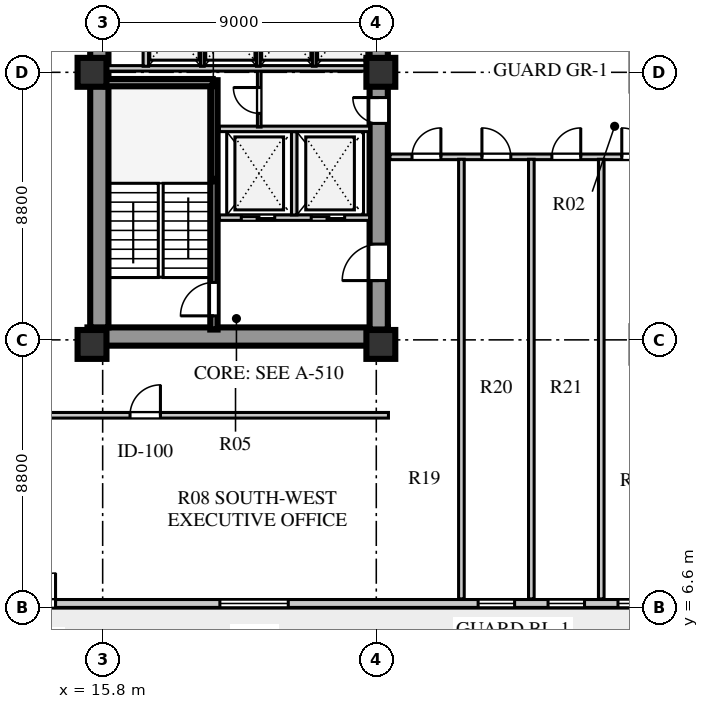
"""IFC4 building model, lengths in metres.
Left out: names, types, materials, properties, quantities, classifications, styles, units other than length and angle.
Written with IfcOpenShell. Run it as: python <this file> out.ifc"""

import sys

from ifc_helpers import new_model, si_unit, direction, frame, frame_2d, origin, origin_2d, place, context, subcontext, project, spatial, rectangle, extrude, element, fill, save


model = new_model("IFC4")
c1 = context("Model", 3, precision=1e-05, world=origin(), true_north=direction((0.0, 1.0)))
c2 = subcontext(c1, "Body", "Model", "MODEL_VIEW")
j1 = project(units=[si_unit("LENGTHUNIT", "METRE"), si_unit("PLANEANGLEUNIT", "RADIAN")], contexts=[c1])
p1 = place(None, origin())
s1 = spatial("IfcSite", under=j1, at=p1, CompositionType="ELEMENT")
p2 = place(p1, origin())
s2 = spatial("IfcBuilding", under=s1, at=p2, CompositionType="ELEMENT")
p3 = place(p2, frame((0.0, 0.0, 74.0)))
s3 = spatial("IfcBuildingStorey", under=s2, at=p3, CompositionType="ELEMENT", Elevation=74.0)
p4 = place(p3, frame((15.3, 15.51, 0.0), z_axis=(0.0, 0.0, 1.0), x_axis=(1.0, 0.0, 0.0)))
e1 = element("IfcWall", 1, at=p4, inside=s3, PredefinedType="SHEAR", context=c2, shape_type="SweptSolid", body=[
    extrude(rectangle(XDim=9.88, YDim=0.6, at=frame_2d((4.94, 0.0))), origin(), (0.0, 0.0, 1.0), 3.72),
])
p5 = place(p3, frame((15.69, 15.81, 0.0), z_axis=(0.0, 0.0, 1.0), x_axis=(0.0, 1.0, 0.0)))
e2 = element("IfcWall", 2, at=p5, inside=s3, PredefinedType="SHEAR", context=c2, shape_type="SweptSolid", body=[
    extrude(rectangle(XDim=25.63, YDim=0.6, at=frame_2d((12.815, 0.0))), origin(), (0.0, 0.0, 1.0), 3.72),
])
p6 = place(p3, frame((24.88, 15.74, 0.0), z_axis=(0.0, 0.0, 1.0), x_axis=(0.0, 1.0, 0.0)))
e3 = element("IfcWall", 3, at=p6, inside=s3, PredefinedType="SHEAR", context=c2, shape_type="SweptSolid", body=[
    extrude(rectangle(XDim=25.76, YDim=0.6, at=frame_2d((12.88, 0.0))), origin(), (0.0, 0.0, 1.0), 3.72),
])
p7 = place(p6, frame((1.61, 0.0, 0.0)))
e4 = element("IfcOpeningElement", 4, at=p7, cuts=e3, PredefinedType="OPENING", context=c2, shape_type="SweptSolid", body=[
    extrude(rectangle(XDim=1.2, YDim=2.1, at=frame_2d((0.6, 1.05))), frame((0.0, 0.31, 0.0), z_axis=(0.0, -1.0, 0.0), x_axis=(1.0, 0.0, 0.0)), (0.0, 0.0, 1.0), 0.62),
])
p8 = place(p6, frame((6.78, 0.0, 0.0)))
e5 = element("IfcOpeningElement", 5, at=p8, cuts=e3, PredefinedType="OPENING", context=c2, shape_type="SweptSolid", body=[
    extrude(rectangle(XDim=0.85, YDim=2.06, at=frame_2d((0.425, 1.03))), frame((0.0, 0.31, 0.0), z_axis=(0.0, -1.0, 0.0), x_axis=(1.0, 0.0, 0.0)), (0.0, 0.0, 1.0), 0.62),
])
p9 = place(p6, frame((12.11, 0.0, 0.0)))
e6 = element("IfcOpeningElement", 6, at=p9, cuts=e3, PredefinedType="OPENING", context=c2, shape_type="SweptSolid", body=[
    extrude(rectangle(XDim=1.5, YDim=2.12, at=frame_2d((0.75, 1.06))), frame((0.0, 0.31, 0.0), z_axis=(0.0, -1.0, 0.0), x_axis=(1.0, 0.0, 0.0)), (0.0, 0.0, 1.0), 0.62),
])
p10 = place(p6, frame((20.11, 0.0, 0.0)))
e7 = element("IfcOpeningElement", 7, at=p10, cuts=e3, PredefinedType="OPENING", context=c2, shape_type="SweptSolid", body=[
    extrude(rectangle(XDim=1.2, YDim=2.12, at=frame_2d((0.6, 1.06))), frame((0.0, 0.31, 0.0), z_axis=(0.0, -1.0, 0.0), x_axis=(1.0, 0.0, 0.0)), (0.0, 0.0, 1.0), 0.62),
])
p11 = place(p6, frame((24.01, 0.0, 0.0)))
e8 = element("IfcOpeningElement", 8, at=p11, cuts=e3, PredefinedType="OPENING", context=c2, shape_type="SweptSolid", body=[
    extrude(rectangle(XDim=0.95, YDim=2.1, at=frame_2d((0.475, 1.05))), frame((0.0, 0.31, 0.0), z_axis=(0.0, -1.0, 0.0), x_axis=(1.0, 0.0, 0.0)), (0.0, 0.0, 1.0), 0.62),
])
for number, where, z_axis, x_axis in (
    (9, (15.45, 15.25, 0.0), (0.0, 0.0, 1.0), (1.0, 0.0, 0.0)),
    (10, (15.45, 24.2, 0.0), (0.0, 0.0, 1.0), (1.0, 0.0, 0.0)),
    (11, (24.95, 15.25, 0.0), (0.0, 0.0, 1.0), (1.0, 0.0, 0.0)),
    (12, (24.95, 24.2, 0.0), (0.0, 0.0, 1.0), (1.0, 0.0, 0.0)),
):
    element("IfcColumn", number, at=place(p3, frame(where, z_axis=z_axis, x_axis=x_axis)), inside=s3, PredefinedType="COLUMN", context=c2, shape_type="SweptSolid", body=[
        extrude(rectangle(XDim=0.95, YDim=0.95, at=origin_2d()), origin(), (0.0, 0.0, 1.0), 3.72),
    ])
p12 = place(p3, frame((12.3, 6.73, 0.0), z_axis=(0.0, 0.0, 1.0), x_axis=(1.0, 0.0, 0.0)))
e13 = element("IfcWall", 13, at=p12, inside=s3, PredefinedType="SOLIDWALL", context=c2, shape_type="SweptSolid", body=[
    extrude(rectangle(XDim=34.0, YDim=0.26, at=frame_2d((17.0, 0.0))), origin(), (0.0, 0.0, 1.0), 3.72),
])
p13 = place(p12, frame((0.95, 0.0, 0.0)))
e14 = element("IfcOpeningElement", 14, at=p13, cuts=e13, PredefinedType="OPENING", context=c2, shape_type="SweptSolid", body=[
    extrude(rectangle(XDim=1.0, YDim=2.05, at=frame_2d((0.5, 1.025))), frame((0.0, 0.14, 0.0), z_axis=(0.0, -1.0, 0.0), x_axis=(1.0, 0.0, 0.0)), (0.0, 0.0, 1.0), 0.28),
])
p14 = place(p12, frame((7.355, 0.0, 0.8)))
e15 = element("IfcOpeningElement", 15, at=p14, cuts=e13, PredefinedType="OPENING", context=c2, shape_type="SweptSolid", body=[
    extrude(rectangle(XDim=2.25, YDim=2.0, at=frame_2d((1.125, 1.0))), frame((0.0, 0.14, 0.0), z_axis=(0.0, -1.0, 0.0), x_axis=(1.0, 0.0, 0.0)), (0.0, 0.0, 1.0), 0.28),
])
p15 = place(p12, frame((15.85, 0.0, 0.8)))
e16 = element("IfcOpeningElement", 16, at=p15, cuts=e13, PredefinedType="OPENING", context=c2, shape_type="SweptSolid", body=[
    extrude(rectangle(XDim=1.2, YDim=1.75, at=frame_2d((0.6, 0.875))), frame((0.0, 0.14, 0.0), z_axis=(0.0, -1.0, 0.0), x_axis=(1.0, 0.0, 0.0)), (0.0, 0.0, 1.0), 0.28),
])
p16 = place(p12, frame((18.15, 0.0, 0.8)))
e17 = element("IfcOpeningElement", 17, at=p16, cuts=e13, PredefinedType="OPENING", context=c2, shape_type="SweptSolid", body=[
    extrude(rectangle(XDim=1.2, YDim=1.75, at=frame_2d((0.6, 0.875))), frame((0.0, 0.14, 0.0), z_axis=(0.0, -1.0, 0.0), x_axis=(1.0, 0.0, 0.0)), (0.0, 0.0, 1.0), 0.28),
])
p17 = place(p12, frame((20.45, 0.0, 0.8)))
e18 = element("IfcOpeningElement", 18, at=p17, cuts=e13, PredefinedType="OPENING", context=c2, shape_type="SweptSolid", body=[
    extrude(rectangle(XDim=1.2, YDim=1.75, at=frame_2d((0.6, 0.875))), frame((0.0, 0.14, 0.0), z_axis=(0.0, -1.0, 0.0), x_axis=(1.0, 0.0, 0.0)), (0.0, 0.0, 1.0), 0.28),
])
p18 = place(p12, frame((28.655, 0.0, 0.8)))
e19 = element("IfcOpeningElement", 19, at=p18, cuts=e13, PredefinedType="OPENING", context=c2, shape_type="SweptSolid", body=[
    extrude(rectangle(XDim=2.4, YDim=2.05, at=frame_2d((1.2, 1.025))), frame((0.0, 0.14, 0.0), z_axis=(0.0, -1.0, 0.0), x_axis=(1.0, 0.0, 0.0)), (0.0, 0.0, 1.0), 0.28),
])
p19 = place(p3, frame((19.46, 15.74, 0.0), z_axis=(0.0, 0.0, 1.0), x_axis=(0.0, 1.0, 0.0)))
e20 = element("IfcWall", 20, at=p19, inside=s3, PredefinedType="SHEAR", context=c2, shape_type="SweptSolid", body=[
    extrude(rectangle(XDim=8.2, YDim=0.24, at=frame_2d((4.1, 0.0))), origin(), (0.0, 0.0, 1.0), 4.0),
])
p20 = place(p19, frame((0.45, 0.0, 0.0)))
e21 = element("IfcOpeningElement", 21, at=p20, cuts=e20, PredefinedType="OPENING", context=c2, shape_type="SweptSolid", body=[
    extrude(rectangle(XDim=1.1, YDim=2.1, at=frame_2d((0.55, 1.05))), frame((0.0, 0.13, 0.0), z_axis=(0.0, -1.0, 0.0), x_axis=(1.0, 0.0, 0.0)), (0.0, 0.0, 1.0), 0.26),
])
p21 = place(p3, frame((15.9, 23.86, 0.0), z_axis=(0.0, 0.0, 1.0), x_axis=(1.0, 0.0, 0.0)))
e22 = element("IfcWall", 22, at=p21, inside=s3, PredefinedType="SHEAR", context=c2, shape_type="SweptSolid", body=[
    extrude(rectangle(XDim=3.52, YDim=0.24, at=frame_2d((1.76, 0.0))), origin(), (0.0, 0.0, 1.0), 4.0),
])
p22 = place(p3, frame((19.64, 19.42, 0.0), z_axis=(0.0, 0.0, 1.0), x_axis=(1.0, 0.0, 0.0)))
e23 = element("IfcWall", 23, at=p22, inside=s3, PredefinedType="SOLIDWALL", context=c2, shape_type="SweptSolid", body=[
    extrude(rectangle(XDim=4.94, YDim=0.18, at=frame_2d((2.47, 0.0))), origin(), (0.0, 0.0, 1.0), 3.72),
])
p23 = place(p22, frame((0.72, 0.0, 0.0)))
e24 = element("IfcOpeningElement", 24, at=p23, cuts=e23, PredefinedType="OPENING", context=c2, shape_type="SweptSolid", body=[
    extrude(rectangle(XDim=1.1, YDim=2.1, at=frame_2d((0.55, 1.05))), frame((0.0, 0.1, 0.0), z_axis=(0.0, -1.0, 0.0), x_axis=(1.0, 0.0, 0.0)), (0.0, 0.0, 1.0), 0.2),
])
p24 = place(p22, frame((3.02, 0.0, 0.0)))
e25 = element("IfcOpeningElement", 25, at=p24, cuts=e23, PredefinedType="OPENING", context=c2, shape_type="SweptSolid", body=[
    extrude(rectangle(XDim=1.1, YDim=2.1, at=frame_2d((0.55, 1.05))), frame((0.0, 0.1, 0.0), z_axis=(0.0, -1.0, 0.0), x_axis=(1.0, 0.0, 0.0)), (0.0, 0.0, 1.0), 0.2),
])
p25 = place(p3, frame((22.1, 19.51, 0.0), z_axis=(0.0, 0.0, 1.0), x_axis=(0.0, 1.0, 0.0)))
e26 = element("IfcWall", 26, at=p25, inside=s3, PredefinedType="SOLIDWALL", context=c2, shape_type="SweptSolid", body=[
    extrude(rectangle(XDim=2.74, YDim=0.18, at=frame_2d((1.37, 0.0))), origin(), (0.0, 0.0, 1.0), 3.72),
])
p26 = place(p3, frame((19.64, 22.34, 0.0), z_axis=(0.0, 0.0, 1.0), x_axis=(1.0, 0.0, 0.0)))
e27 = element("IfcWall", 27, at=p26, inside=s3, PredefinedType="SOLIDWALL", context=c2, shape_type="SweptSolid", body=[
    extrude(rectangle(XDim=4.94, YDim=0.18, at=frame_2d((2.47, 0.0))), origin(), (0.0, 0.0, 1.0), 3.72),
])
p27 = place(p3, frame((20.95, 22.4, 0.0), z_axis=(0.0, 0.0, 1.0), x_axis=(0.0, 1.0, 0.0)))
e28 = element("IfcWall", 28, at=p27, inside=s3, PredefinedType="PARTITIONING", context=c2, shape_type="SweptSolid", body=[
    extrude(rectangle(XDim=1.88, YDim=0.12, at=frame_2d((0.94, 0.0))), origin(), (0.0, 0.0, 1.0), 3.72),
])
p28 = place(p27, frame((0.45, 0.0, 0.0)))
e29 = element("IfcOpeningElement", 29, at=p28, cuts=e28, PredefinedType="OPENING", context=c2, shape_type="SweptSolid", body=[
    extrude(rectangle(XDim=0.85, YDim=2.06, at=frame_2d((0.425, 1.03))), frame((0.0, 0.07, 0.0), z_axis=(0.0, -1.0, 0.0), x_axis=(1.0, 0.0, 0.0)), (0.0, 0.0, 1.0), 0.14),
])
p29 = place(p3, frame((15.9, 24.33, 0.0), z_axis=(0.0, 0.0, 1.0), x_axis=(1.0, 0.0, 0.0)))
e30 = element("IfcWall", 30, at=p29, inside=s3, PredefinedType="SOLIDWALL", context=c2, shape_type="SweptSolid", body=[
    extrude(rectangle(XDim=8.68, YDim=0.18, at=frame_2d((4.34, 0.0))), origin(), (0.0, 0.0, 1.0), 3.02),
])
p30 = place(p3, frame((17.22, 24.4, 0.0), z_axis=(0.0, 0.0, 1.0), x_axis=(0.0, 1.0, 0.0)))
e31 = element("IfcWall", 31, at=p30, inside=s3, PredefinedType="SOLIDWALL", context=c2, shape_type="SweptSolid", body=[
    extrude(rectangle(XDim=2.05, YDim=0.18, at=frame_2d((1.025, 0.0))), origin(), (0.0, 0.0, 1.0), 3.72),
])
for number, where, z_axis, x_axis in (
    (32, (19.08, 24.4, 0.0), (0.0, 0.0, 1.0), (0.0, 1.0, 0.0)),
    (33, (20.92, 24.4, 0.0), (0.0, 0.0, 1.0), (0.0, 1.0, 0.0)),
    (34, (22.76, 24.4, 0.0), (0.0, 0.0, 1.0), (0.0, 1.0, 0.0)),
):
    element("IfcWall", number, at=place(p3, frame(where, z_axis=z_axis, x_axis=x_axis)), inside=s3, PredefinedType="PARTITIONING", context=c2, shape_type="SweptSolid", body=[
        extrude(rectangle(XDim=2.05, YDim=0.12, at=frame_2d((1.025, 0.0))), origin(), (0.0, 0.0, 1.0), 3.72),
    ])
p31 = place(p3, frame((25.25, 21.42, 0.0), z_axis=(0.0, 0.0, 1.0), x_axis=(1.0, 0.0, 0.0)))
e35 = element("IfcWall", 35, at=p31, inside=s3, PredefinedType="SOLIDWALL", context=c2, shape_type="SweptSolid", body=[
    extrude(rectangle(XDim=12.87, YDim=0.185, at=frame_2d((6.435, 0.0))), origin(), (0.0, 0.0, 1.0), 3.32),
])
p32 = place(p31, frame((0.725, 0.0, 0.0)))
e36 = element("IfcOpeningElement", 36, at=p32, cuts=e35, PredefinedType="OPENING", context=c2, shape_type="SweptSolid", body=[
    extrude(rectangle(XDim=0.95, YDim=2.08, at=frame_2d((0.475, 1.04))), frame((0.0, 0.103, 0.0), z_axis=(0.0, -1.0, 0.0), x_axis=(1.0, 0.0, 0.0)), (0.0, 0.0, 1.0), 0.205),
])
p33 = place(p31, frame((3.025, 0.0, 0.0)))
e37 = element("IfcOpeningElement", 37, at=p33, cuts=e35, PredefinedType="OPENING", context=c2, shape_type="SweptSolid", body=[
    extrude(rectangle(XDim=0.95, YDim=2.08, at=frame_2d((0.475, 1.04))), frame((0.0, 0.103, 0.0), z_axis=(0.0, -1.0, 0.0), x_axis=(1.0, 0.0, 0.0)), (0.0, 0.0, 1.0), 0.205),
])
p34 = place(p31, frame((5.325, 0.0, 0.0)))
e38 = element("IfcOpeningElement", 38, at=p34, cuts=e35, PredefinedType="OPENING", context=c2, shape_type="SweptSolid", body=[
    extrude(rectangle(XDim=0.95, YDim=2.08, at=frame_2d((0.475, 1.04))), frame((0.0, 0.103, 0.0), z_axis=(0.0, -1.0, 0.0), x_axis=(1.0, 0.0, 0.0)), (0.0, 0.0, 1.0), 0.205),
])
p35 = place(p31, frame((7.625, 0.0, 0.0)))
e39 = element("IfcOpeningElement", 39, at=p35, cuts=e35, PredefinedType="OPENING", context=c2, shape_type="SweptSolid", body=[
    extrude(rectangle(XDim=0.95, YDim=2.08, at=frame_2d((0.475, 1.04))), frame((0.0, 0.103, 0.0), z_axis=(0.0, -1.0, 0.0), x_axis=(1.0, 0.0, 0.0)), (0.0, 0.0, 1.0), 0.205),
])
p36 = place(p31, frame((9.725, 0.0, 0.0)))
e40 = element("IfcOpeningElement", 40, at=p36, cuts=e35, PredefinedType="OPENING", context=c2, shape_type="SweptSolid", body=[
    extrude(rectangle(XDim=0.95, YDim=2.08, at=frame_2d((0.475, 1.04))), frame((0.0, 0.103, 0.0), z_axis=(0.0, -1.0, 0.0), x_axis=(1.0, 0.0, 0.0)), (0.0, 0.0, 1.0), 0.205),
])
p37 = place(p31, frame((11.495, 0.0, 0.0)))
e41 = element("IfcOpeningElement", 41, at=p37, cuts=e35, PredefinedType="OPENING", context=c2, shape_type="SweptSolid", body=[
    extrude(rectangle(XDim=0.95, YDim=2.08, at=frame_2d((0.475, 1.04))), frame((0.0, 0.103, 0.0), z_axis=(0.0, -1.0, 0.0), x_axis=(1.0, 0.0, 0.0)), (0.0, 0.0, 1.0), 0.205),
])
p38 = place(p3, frame((10.5, 12.92, 0.0), z_axis=(0.0, 0.0, 1.0), x_axis=(1.0, 0.0, 0.0)))
e42 = element("IfcWall", 42, at=p38, inside=s3, PredefinedType="SOLIDWALL", context=c2, shape_type="SweptSolid", body=[
    extrude(rectangle(XDim=14.7, YDim=0.185, at=frame_2d((7.35, 0.0))), origin(), (0.0, 0.0, 1.0), 3.72),
])
p39 = place(p38, frame((6.2, 0.0, 0.0)))
e43 = element("IfcOpeningElement", 43, at=p39, cuts=e42, PredefinedType="OPENING", context=c2, shape_type="SweptSolid", body=[
    extrude(rectangle(XDim=1.0, YDim=2.08, at=frame_2d((0.5, 1.04))), frame((0.0, 0.103, 0.0), z_axis=(0.0, -1.0, 0.0), x_axis=(1.0, 0.0, 0.0)), (0.0, 0.0, 1.0), 0.205),
])
for number, where, z_axis, x_axis in (
    (44, (27.6, 6.88, 0.0), (0.0, 0.0, 1.0), (0.0, 1.0, 0.0)),
    (45, (29.9, 6.88, 0.0), (0.0, 0.0, 1.0), (0.0, 1.0, 0.0)),
    (46, (32.2, 6.88, 0.0), (0.0, 0.0, 1.0), (0.0, 1.0, 0.0)),
):
    element("IfcWall", number, at=place(p3, frame(where, z_axis=z_axis, x_axis=x_axis)), inside=s3, PredefinedType="SOLIDWALL", context=c2, shape_type="SweptSolid", body=[
        extrude(rectangle(XDim=14.46, YDim=0.185, at=frame_2d((7.23, 0.0))), origin(), (0.0, 0.0, 1.0), 3.72),
    ])
p40 = place(p13, frame((1.0, 0.0, 0.0), z_axis=(0.0, 0.0, 1.0), x_axis=(-1.0, 0.0, 0.0)))
e47 = element("IfcDoor", 47, at=p40, inside=s3, OperationType="SINGLE_SWING_LEFT", PredefinedType="DOOR", context=c2, shape_type="SweptSolid", body=[
    extrude(rectangle(XDim=1.0, YDim=2.05, at=frame_2d((0.5, 1.025))), frame((0.0, 0.025, 0.0), z_axis=(0.0, -1.0, 0.0), x_axis=(1.0, 0.0, 0.0)), (0.0, 0.0, 1.0), 0.05),
])
fill(e14, e47)
p41 = place(p14, origin())
e48 = element("IfcWindow", 48, at=p41, inside=s3, PartitioningType="SINGLE_PANEL", PredefinedType="WINDOW", context=c2, shape_type="SweptSolid", body=[
    extrude(rectangle(XDim=2.25, YDim=2.0, at=frame_2d((1.125, 1.0))), frame((0.0, 0.03, 0.0), z_axis=(0.0, -1.0, 0.0), x_axis=(1.0, 0.0, 0.0)), (0.0, 0.0, 1.0), 0.06),
])
fill(e15, e48)
p42 = place(p15, origin())
e49 = element("IfcWindow", 49, at=p42, inside=s3, PartitioningType="SINGLE_PANEL", PredefinedType="WINDOW", context=c2, shape_type="SweptSolid", body=[
    extrude(rectangle(XDim=1.2, YDim=1.75, at=frame_2d((0.6, 0.875))), frame((0.0, 0.03, 0.0), z_axis=(0.0, -1.0, 0.0), x_axis=(1.0, 0.0, 0.0)), (0.0, 0.0, 1.0), 0.06),
])
fill(e16, e49)
p43 = place(p16, origin())
e50 = element("IfcWindow", 50, at=p43, inside=s3, PartitioningType="SINGLE_PANEL", PredefinedType="WINDOW", context=c2, shape_type="SweptSolid", body=[
    extrude(rectangle(XDim=1.2, YDim=1.75, at=frame_2d((0.6, 0.875))), frame((0.0, 0.03, 0.0), z_axis=(0.0, -1.0, 0.0), x_axis=(1.0, 0.0, 0.0)), (0.0, 0.0, 1.0), 0.06),
])
fill(e17, e50)
p44 = place(p17, origin())
e51 = element("IfcWindow", 51, at=p44, inside=s3, PartitioningType="SINGLE_PANEL", PredefinedType="WINDOW", context=c2, shape_type="SweptSolid", body=[
    extrude(rectangle(XDim=1.2, YDim=1.75, at=frame_2d((0.6, 0.875))), frame((0.0, 0.03, 0.0), z_axis=(0.0, -1.0, 0.0), x_axis=(1.0, 0.0, 0.0)), (0.0, 0.0, 1.0), 0.06),
])
fill(e18, e51)
p45 = place(p20, origin())
e52 = element("IfcDoor", 52, at=p45, inside=s3, OperationType="SINGLE_SWING_LEFT", PredefinedType="DOOR", context=c2, shape_type="SweptSolid", body=[
    extrude(rectangle(XDim=1.1, YDim=2.1, at=frame_2d((0.55, 1.05))), frame((0.0, 0.025, 0.0), z_axis=(0.0, -1.0, 0.0), x_axis=(1.0, 0.0, 0.0)), (0.0, 0.0, 1.0), 0.05),
])
fill(e21, e52)
p46 = place(p23, origin())
e53 = element("IfcDoor", 53, at=p46, inside=s3, OperationType="DOUBLE_DOOR_SLIDING", PredefinedType="DOOR", context=c2, shape_type="SweptSolid", body=[
    extrude(rectangle(XDim=1.1, YDim=2.1, at=frame_2d((0.55, 1.05))), frame((0.0, 0.025, 0.0), z_axis=(0.0, -1.0, 0.0), x_axis=(1.0, 0.0, 0.0)), (0.0, 0.0, 1.0), 0.05),
])
fill(e24, e53)
p47 = place(p24, origin())
e54 = element("IfcDoor", 54, at=p47, inside=s3, OperationType="DOUBLE_DOOR_SLIDING", PredefinedType="DOOR", context=c2, shape_type="SweptSolid", body=[
    extrude(rectangle(XDim=1.1, YDim=2.1, at=frame_2d((0.55, 1.05))), frame((0.0, 0.025, 0.0), z_axis=(0.0, -1.0, 0.0), x_axis=(1.0, 0.0, 0.0)), (0.0, 0.0, 1.0), 0.05),
])
fill(e25, e54)
p48 = place(p7, frame((1.2, 0.0, 0.0), z_axis=(0.0, 0.0, 1.0), x_axis=(-1.0, 0.0, 0.0)))
e55 = element("IfcDoor", 55, at=p48, inside=s3, OperationType="SINGLE_SWING_RIGHT", PredefinedType="DOOR", context=c2, shape_type="SweptSolid", body=[
    extrude(rectangle(XDim=1.2, YDim=2.1, at=frame_2d((0.6, 1.05))), frame((0.0, 0.025, 0.0), z_axis=(0.0, -1.0, 0.0), x_axis=(1.0, 0.0, 0.0)), (0.0, 0.0, 1.0), 0.05),
])
fill(e4, e55)
p49 = place(p28, origin())
e56 = element("IfcDoor", 56, at=p49, inside=s3, OperationType="SINGLE_SWING_RIGHT", PredefinedType="DOOR", context=c2, shape_type="SweptSolid", body=[
    extrude(rectangle(XDim=0.85, YDim=2.06, at=frame_2d((0.425, 1.03))), frame((0.0, 0.025, 0.0), z_axis=(0.0, -1.0, 0.0), x_axis=(1.0, 0.0, 0.0)), (0.0, 0.0, 1.0), 0.05),
])
fill(e29, e56)
p50 = place(p8, frame((0.85, 0.0, 0.0), z_axis=(0.0, 0.0, 1.0), x_axis=(-1.0, 0.0, 0.0)))
e57 = element("IfcDoor", 57, at=p50, inside=s3, OperationType="SINGLE_SWING_LEFT", PredefinedType="DOOR", context=c2, shape_type="SweptSolid", body=[
    extrude(rectangle(XDim=0.85, YDim=2.06, at=frame_2d((0.425, 1.03))), frame((0.0, 0.025, 0.0), z_axis=(0.0, -1.0, 0.0), x_axis=(1.0, 0.0, 0.0)), (0.0, 0.0, 1.0), 0.05),
])
fill(e5, e57)
p51 = place(p39, frame((1.0, 0.0, 0.0), z_axis=(0.0, 0.0, 1.0), x_axis=(-1.0, 0.0, 0.0)))
e58 = element("IfcDoor", 58, at=p51, inside=s3, OperationType="SINGLE_SWING_LEFT", PredefinedType="DOOR", context=c2, shape_type="SweptSolid", body=[
    extrude(rectangle(XDim=1.0, YDim=2.08, at=frame_2d((0.5, 1.04))), frame((0.0, 0.025, 0.0), z_axis=(0.0, -1.0, 0.0), x_axis=(1.0, 0.0, 0.0)), (0.0, 0.0, 1.0), 0.05),
])
fill(e43, e58)
p52 = place(p32, frame((0.95, 0.0, 0.0), z_axis=(0.0, 0.0, 1.0), x_axis=(-1.0, 0.0, 0.0)))
e59 = element("IfcDoor", 59, at=p52, inside=s3, OperationType="SINGLE_SWING_LEFT", PredefinedType="DOOR", context=c2, shape_type="SweptSolid", body=[
    extrude(rectangle(XDim=0.95, YDim=2.08, at=frame_2d((0.475, 1.04))), frame((0.0, 0.025, 0.0), z_axis=(0.0, -1.0, 0.0), x_axis=(1.0, 0.0, 0.0)), (0.0, 0.0, 1.0), 0.05),
])
fill(e36, e59)
p53 = place(p33, frame((0.95, 0.0, 0.0), z_axis=(0.0, 0.0, 1.0), x_axis=(-1.0, 0.0, 0.0)))
e60 = element("IfcDoor", 60, at=p53, inside=s3, OperationType="SINGLE_SWING_RIGHT", PredefinedType="DOOR", context=c2, shape_type="SweptSolid", body=[
    extrude(rectangle(XDim=0.95, YDim=2.08, at=frame_2d((0.475, 1.04))), frame((0.0, 0.025, 0.0), z_axis=(0.0, -1.0, 0.0), x_axis=(1.0, 0.0, 0.0)), (0.0, 0.0, 1.0), 0.05),
])
fill(e37, e60)
p54 = place(p34, frame((0.95, 0.0, 0.0), z_axis=(0.0, 0.0, 1.0), x_axis=(-1.0, 0.0, 0.0)))
e61 = element("IfcDoor", 61, at=p54, inside=s3, OperationType="SINGLE_SWING_LEFT", PredefinedType="DOOR", context=c2, shape_type="SweptSolid", body=[
    extrude(rectangle(XDim=0.95, YDim=2.08, at=frame_2d((0.475, 1.04))), frame((0.0, 0.025, 0.0), z_axis=(0.0, -1.0, 0.0), x_axis=(1.0, 0.0, 0.0)), (0.0, 0.0, 1.0), 0.05),
])
fill(e38, e61)
p55 = place(p35, frame((0.95, 0.0, 0.0), z_axis=(0.0, 0.0, 1.0), x_axis=(-1.0, 0.0, 0.0)))
e62 = element("IfcDoor", 62, at=p55, inside=s3, OperationType="SINGLE_SWING_RIGHT", PredefinedType="DOOR", context=c2, shape_type="SweptSolid", body=[
    extrude(rectangle(XDim=0.95, YDim=2.08, at=frame_2d((0.475, 1.04))), frame((0.0, 0.025, 0.0), z_axis=(0.0, -1.0, 0.0), x_axis=(1.0, 0.0, 0.0)), (0.0, 0.0, 1.0), 0.05),
])
fill(e39, e62)
save(model, sys.argv[1])
